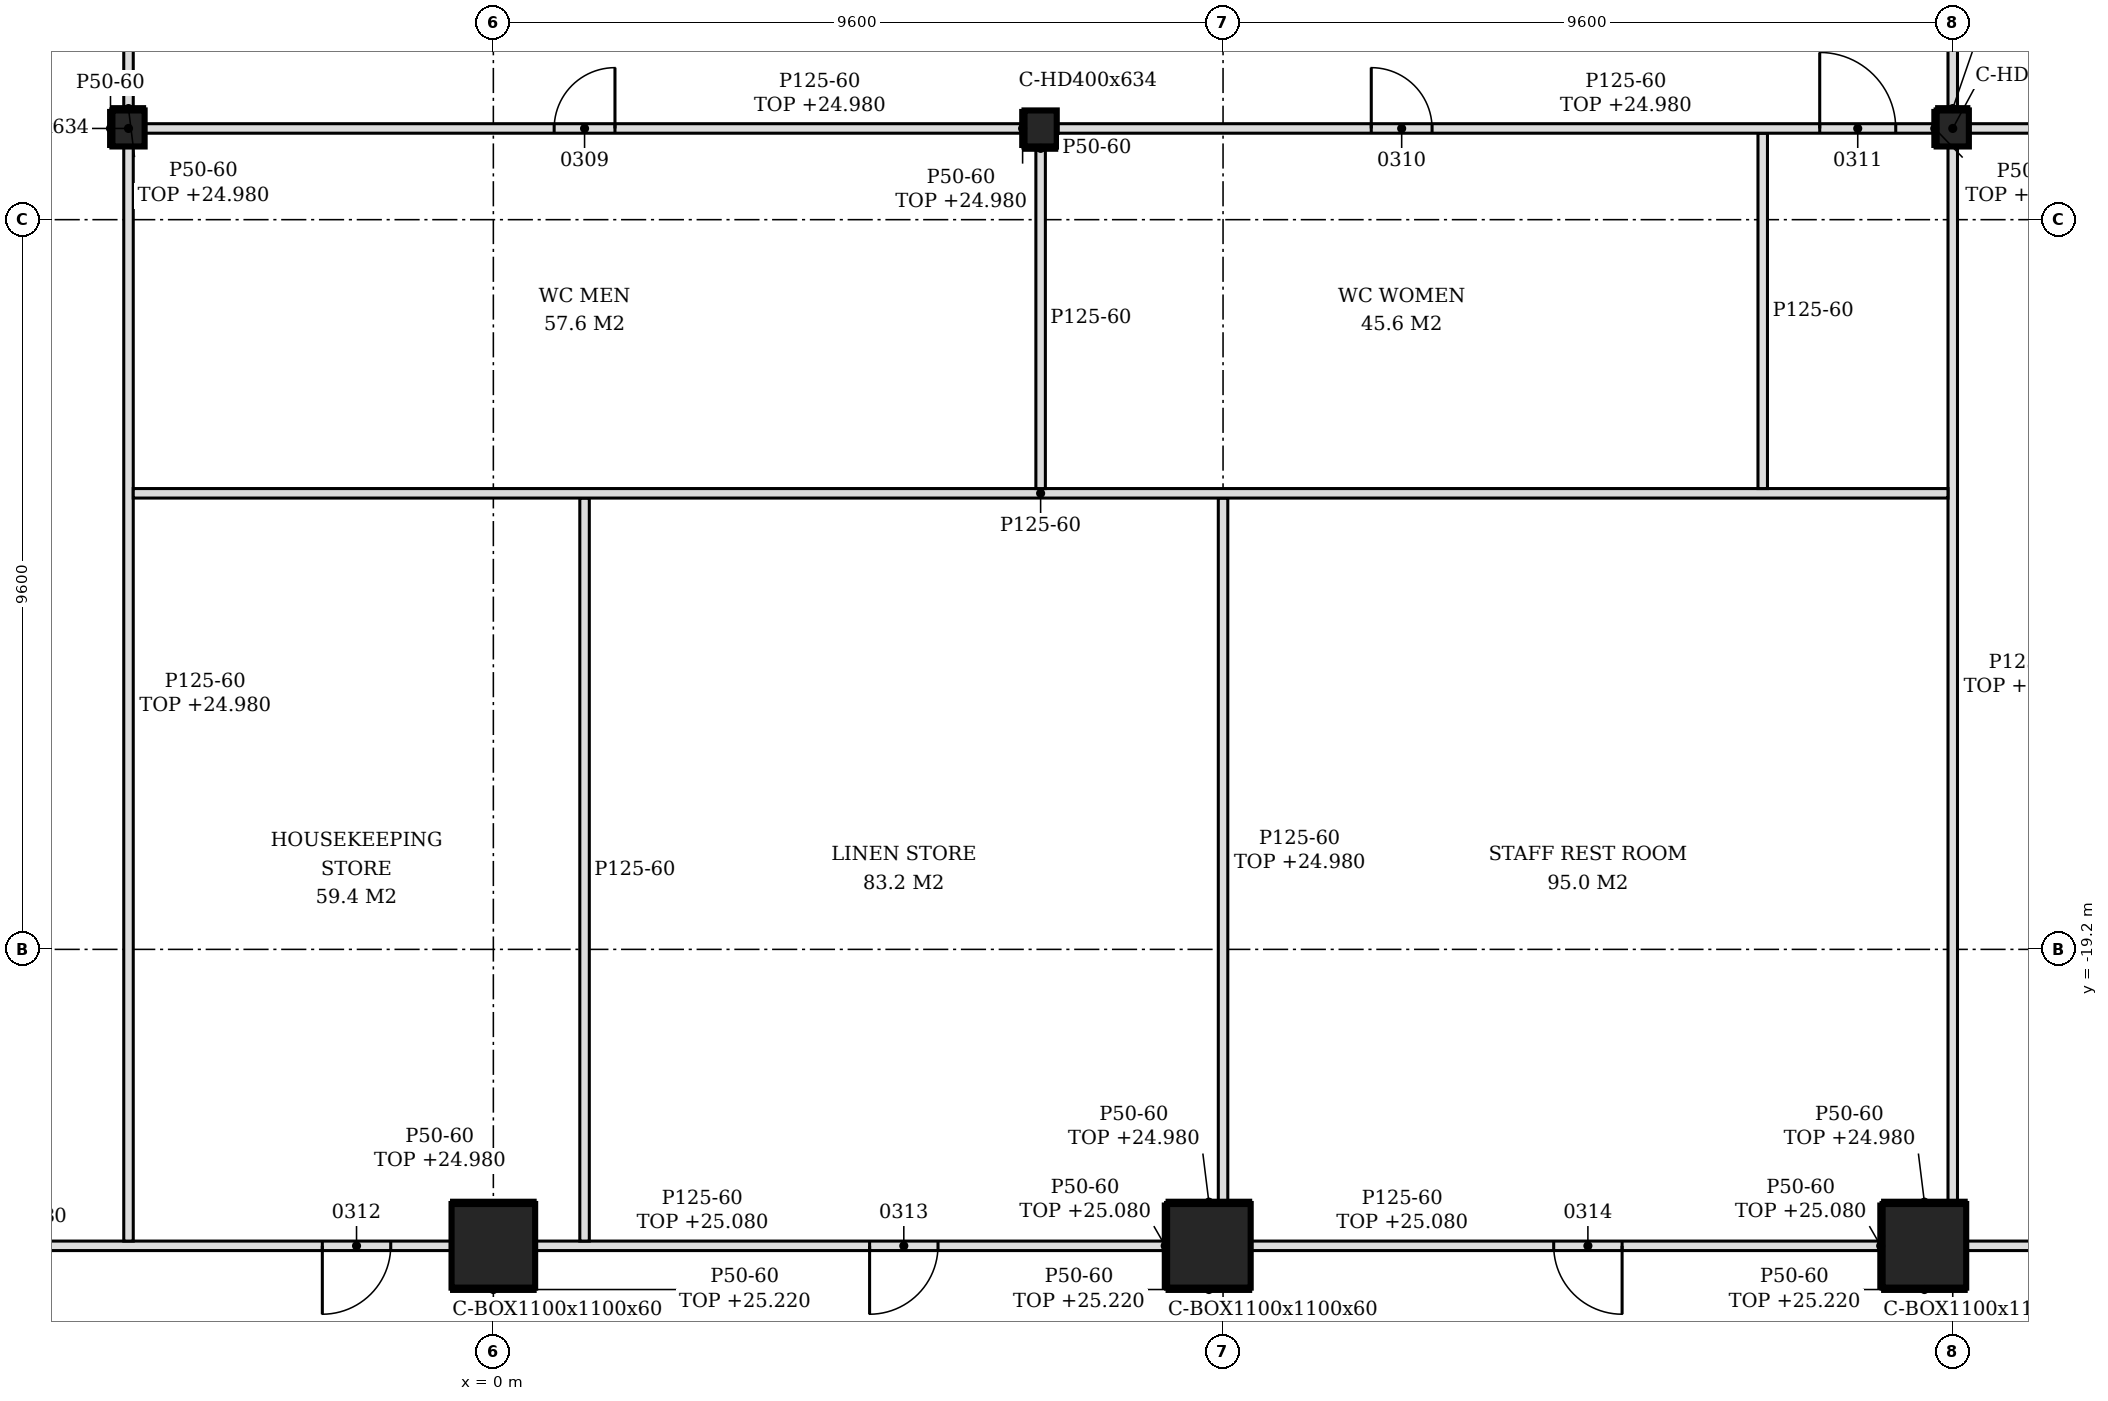
"""IFC4 building model, lengths in metres.
Left out: names, types, materials, properties, quantities, classifications, styles, units other than length and angle.
Written with IfcOpenShell. Run it as: python <this file> out.ifc"""

import sys

from ifc_helpers import new_model, si_unit, direction, frame, frame_2d, origin, origin_2d, place, context, subcontext, project, spatial, polyline, rectangle, hollow_rectangle, i_section, outline, extrude, element, fill, save


model = new_model("IFC4")
c1 = context("Model", 3, precision=1e-05, world=origin(), true_north=direction((0.0, 1.0)))
c2 = subcontext(c1, "Body", "Model", "MODEL_VIEW")
j1 = project(units=[si_unit("LENGTHUNIT", "METRE"), si_unit("PLANEANGLEUNIT", "RADIAN")], contexts=[c1])
p1 = place(None, origin())
s1 = spatial("IfcSite", under=j1, at=p1, CompositionType="ELEMENT")
p2 = place(p1, origin())
s2 = spatial("IfcBuilding", under=s1, at=p2, CompositionType="ELEMENT")
p3 = place(p2, frame((0.0, 0.0, 21.0)))
s3 = spatial("IfcBuildingStorey", under=s2, at=p3, CompositionType="ELEMENT", Elevation=21.0)
for number, where, z_axis, x_axis in (
    (1, (0.0, -23.1, -0.2), (0.0, 0.0, 1.0), (1.0, 0.0, 0.0)),
    (2, (9.414, -23.1, -0.2), (0.0, 0.0, 1.0), (1.0, 0.0, 0.0)),
    (3, (18.827, -23.1, -0.2), (0.0, 0.0, 1.0), (1.0, 0.0, 0.0)),
):
    element("IfcColumn", number, at=place(p3, frame(where, z_axis=z_axis, x_axis=x_axis)), inside=s3, PredefinedType="COLUMN", context=c2, shape_type="SweptSolid", body=[
        extrude(hollow_rectangle(XDim=1.1, YDim=1.1, WallThickness=0.06, at=origin_2d()), origin(), (0.0, 0.0, 1.0), 4.8),
    ])
for number, where, z_axis, x_axis in (
    (4, (-4.8, -8.4, -0.2), (0.0, 0.0, 1.0), (1.0, 0.0, 0.0)),
    (5, (7.2, -8.4, -0.2), (0.0, 0.0, 1.0), (1.0, 0.0, 0.0)),
    (6, (19.2, -8.4, -0.2), (0.0, 0.0, 1.0), (1.0, 0.0, 0.0)),
):
    element("IfcColumn", number, at=place(p3, frame(where, z_axis=z_axis, x_axis=x_axis)), inside=s3, PredefinedType="COLUMN", context=c2, shape_type="SweptSolid", body=[
        extrude(i_section(OverallWidth=0.424, OverallDepth=0.474, WebThickness=0.048, FlangeThickness=0.077, FilletRadius=0.015, at=origin_2d()), origin(), (0.0, 0.0, 1.0), 4.8),
    ])
p4 = place(p3, frame((-8.864, -23.1, 0.0), z_axis=(0.0, 0.0, 1.0), x_axis=(1.0, 0.0, 0.0)))
e7 = element("IfcWall", 7, at=p4, inside=s3, PredefinedType="PARTITIONING", context=c2, shape_type="SweptSolid", body=[
    extrude(rectangle(XDim=8.313, YDim=0.125, at=frame_2d((4.157, 0.0))), origin(), (0.0, 0.0, 1.0), 4.08),
])
p5 = place(p4, frame((6.614, 0.0, 0.0)))
e8 = element("IfcOpeningElement", 8, at=p5, cuts=e7, PredefinedType="OPENING", context=c2, shape_type="SweptSolid", body=[
    extrude(rectangle(XDim=0.9, YDim=2.1, at=frame_2d((0.45, 1.05))), frame((0.0, 0.073, 0.0), z_axis=(0.0, -1.0, 0.0), x_axis=(1.0, 0.0, 0.0)), (0.0, 0.0, 1.0), 0.145),
])
p6 = place(p3, frame((0.55, -23.1, 0.0), z_axis=(0.0, 0.0, 1.0), x_axis=(1.0, 0.0, 0.0)))
e9 = element("IfcWall", 9, at=p6, inside=s3, PredefinedType="PARTITIONING", context=c2, shape_type="SweptSolid", body=[
    extrude(rectangle(XDim=8.313, YDim=0.125, at=frame_2d((4.157, 0.0))), origin(), (0.0, 0.0, 1.0), 4.08),
])
p7 = place(p6, frame((4.4, 0.0, 0.0)))
e10 = element("IfcOpeningElement", 10, at=p7, cuts=e9, PredefinedType="OPENING", context=c2, shape_type="SweptSolid", body=[
    extrude(rectangle(XDim=0.9, YDim=2.1, at=frame_2d((0.45, 1.05))), frame((0.0, 0.073, 0.0), z_axis=(0.0, -1.0, 0.0), x_axis=(1.0, 0.0, 0.0)), (0.0, 0.0, 1.0), 0.145),
])
p8 = place(p3, frame((9.964, -23.1, 0.0), z_axis=(0.0, 0.0, 1.0), x_axis=(1.0, 0.0, 0.0)))
e11 = element("IfcWall", 11, at=p8, inside=s3, PredefinedType="PARTITIONING", context=c2, shape_type="SweptSolid", body=[
    extrude(rectangle(XDim=8.313, YDim=0.125, at=frame_2d((4.157, 0.0))), origin(), (0.0, 0.0, 1.0), 4.08),
])
p9 = place(p8, frame((3.986, 0.0, 0.0)))
e12 = element("IfcOpeningElement", 12, at=p9, cuts=e11, PredefinedType="OPENING", context=c2, shape_type="SweptSolid", body=[
    extrude(rectangle(XDim=0.9, YDim=2.1, at=frame_2d((0.45, 1.05))), frame((0.0, 0.073, 0.0), z_axis=(0.0, -1.0, 0.0), x_axis=(1.0, 0.0, 0.0)), (0.0, 0.0, 1.0), 0.145),
])
p10 = place(p3, frame((19.377, -23.1, 0.0), z_axis=(0.0, 0.0, 1.0), x_axis=(1.0, 0.0, 0.0)))
e13 = element("IfcWall", 13, at=p10, inside=s3, PredefinedType="PARTITIONING", context=c2, shape_type="SweptSolid", body=[
    extrude(rectangle(XDim=8.585, YDim=0.125, at=frame_2d((4.292, 0.0))), origin(), (0.0, 0.0, 1.0), 4.6),
])
p11 = place(p3, frame((-4.8, -23.038, 0.0), z_axis=(0.0, 0.0, 1.0), x_axis=(0.0, 1.0, 0.0)))
e14 = element("IfcWall", 14, at=p11, inside=s3, PredefinedType="PARTITIONING", context=c2, shape_type="SweptSolid", body=[
    extrude(rectangle(XDim=14.401, YDim=0.125, at=frame_2d((7.2, 0.0))), origin(), (0.0, 0.0, 1.0), 3.98),
])
p12 = place(p3, frame((1.2, -23.038, 0.0), z_axis=(0.0, 0.0, 1.0), x_axis=(0.0, 1.0, 0.0)))
e15 = element("IfcWall", 15, at=p12, inside=s3, PredefinedType="PARTITIONING", context=c2, shape_type="SweptSolid", body=[
    extrude(outline(polyline([(0.0, 0.0), (9.775, 0.0), (9.775, 4.6), (0.087, 4.6), (0.085, 4.08), (0.0, 4.08), (0.0, 0.0)])), frame((0.0, 0.062, 0.0), z_axis=(0.0, -1.0, 0.0), x_axis=(1.0, 0.0, 0.0)), (0.0, 0.0, 1.0), 0.125),
])
p13 = place(p3, frame((9.6, -22.55, 0.0), z_axis=(0.0, 0.0, 1.0), x_axis=(0.0, 1.0, 0.0)))
e16 = element("IfcWall", 16, at=p13, inside=s3, PredefinedType="PARTITIONING", context=c2, shape_type="SweptSolid", body=[
    extrude(rectangle(XDim=9.288, YDim=0.125, at=frame_2d((4.644, 0.0))), origin(), (0.0, 0.0, 1.0), 3.98),
])
p14 = place(p3, frame((19.2, -22.55, 0.0), z_axis=(0.0, 0.0, 1.0), x_axis=(0.0, 1.0, 0.0)))
e17 = element("IfcWall", 17, at=p14, inside=s3, PredefinedType="PARTITIONING", context=c2, shape_type="SweptSolid", body=[
    extrude(rectangle(XDim=13.913, YDim=0.125, at=frame_2d((6.957, 0.0))), origin(), (0.0, 0.0, 1.0), 3.98),
])
p15 = place(p3, frame((-4.738, -13.2, 0.0), z_axis=(0.0, 0.0, 1.0), x_axis=(1.0, 0.0, 0.0)))
e18 = element("IfcWall", 18, at=p15, inside=s3, PredefinedType="PARTITIONING", context=c2, shape_type="SweptSolid", body=[
    extrude(outline(polyline([(0.0, 0.0), (23.875, 0.0), (23.875, 3.98), (23.788, 3.98), (23.785, 4.6), (19.288, 4.6), (19.285, 3.98), (18.988, 3.98), (18.986, 4.6), (14.488, 4.6), (14.486, 3.98), (14.188, 3.98), (14.186, 4.6), (9.688, 4.6), (9.686, 3.98), (9.387, 3.98), (9.385, 4.6), (4.887, 4.6), (4.885, 3.98), (4.587, 3.98), (4.585, 4.6), (0.087, 4.6), (0.085, 3.98), (0.0, 3.98), (0.0, 0.0)])), frame((0.0, 0.062, 0.0), z_axis=(0.0, -1.0, 0.0), x_axis=(1.0, 0.0, 0.0)), (0.0, 0.0, 1.0), 0.125),
])
p16 = place(p3, frame((7.2, -13.137, 0.0), z_axis=(0.0, 0.0, 1.0), x_axis=(0.0, 1.0, 0.0)))
e19 = element("IfcWall", 19, at=p16, inside=s3, PredefinedType="PARTITIONING", context=c2, shape_type="SweptSolid", body=[
    extrude(rectangle(XDim=4.5, YDim=0.125, at=frame_2d((2.25, 0.0))), origin(), (0.0, 0.0, 1.0), 4.6),
])
p17 = place(p3, frame((16.7, -13.137, 0.0), z_axis=(0.0, 0.0, 1.0), x_axis=(0.0, 1.0, 0.0)))
e20 = element("IfcWall", 20, at=p17, inside=s3, PredefinedType="PARTITIONING", context=c2, shape_type="SweptSolid", body=[
    extrude(outline(polyline([(0.0, 0.0), (4.675, 0.0), (4.675, 3.98), (4.587, 3.98), (4.585, 4.6), (0.0, 4.6), (0.0, 0.0)])), frame((0.0, 0.062, 0.0), z_axis=(0.0, -1.0, 0.0), x_axis=(1.0, 0.0, 0.0)), (0.0, 0.0, 1.0), 0.125),
])
p18 = place(p3, frame((-4.588, -8.4, 0.0), z_axis=(0.0, 0.0, 1.0), x_axis=(1.0, 0.0, 0.0)))
e21 = element("IfcWall", 21, at=p18, inside=s3, PredefinedType="PARTITIONING", context=c2, shape_type="SweptSolid", body=[
    extrude(rectangle(XDim=11.576, YDim=0.125, at=frame_2d((5.788, 0.0))), origin(), (0.0, 0.0, 1.0), 3.98),
])
p19 = place(p18, frame((5.388, 0.0, 0.0)))
e22 = element("IfcOpeningElement", 22, at=p19, cuts=e21, PredefinedType="OPENING", context=c2, shape_type="SweptSolid", body=[
    extrude(rectangle(XDim=0.8, YDim=2.1, at=frame_2d((0.4, 1.05))), frame((0.0, 0.073, 0.0), z_axis=(0.0, -1.0, 0.0), x_axis=(1.0, 0.0, 0.0)), (0.0, 0.0, 1.0), 0.145),
])
p20 = place(p3, frame((7.412, -8.4, 0.0), z_axis=(0.0, 0.0, 1.0), x_axis=(1.0, 0.0, 0.0)))
e23 = element("IfcWall", 23, at=p20, inside=s3, PredefinedType="PARTITIONING", context=c2, shape_type="SweptSolid", body=[
    extrude(rectangle(XDim=11.576, YDim=0.125, at=frame_2d((5.788, 0.0))), origin(), (0.0, 0.0, 1.0), 3.98),
])
p21 = place(p20, frame((4.138, 0.0, 0.0)))
e24 = element("IfcOpeningElement", 24, at=p21, cuts=e23, PredefinedType="OPENING", context=c2, shape_type="SweptSolid", body=[
    extrude(rectangle(XDim=0.8, YDim=2.1, at=frame_2d((0.4, 1.05))), frame((0.0, 0.073, 0.0), z_axis=(0.0, -1.0, 0.0), x_axis=(1.0, 0.0, 0.0)), (0.0, 0.0, 1.0), 0.145),
])
p22 = place(p20, frame((10.038, 0.0, 0.0)))
e25 = element("IfcOpeningElement", 25, at=p22, cuts=e23, PredefinedType="OPENING", context=c2, shape_type="SweptSolid", body=[
    extrude(rectangle(XDim=1.0, YDim=2.1, at=frame_2d((0.5, 1.05))), frame((0.0, 0.073, 0.0), z_axis=(0.0, -1.0, 0.0), x_axis=(1.0, 0.0, 0.0)), (0.0, 0.0, 1.0), 0.145),
])
p23 = place(p3, frame((19.412, -8.4, 0.0), z_axis=(0.0, 0.0, 1.0), x_axis=(1.0, 0.0, 0.0)))
e26 = element("IfcWall", 26, at=p23, inside=s3, PredefinedType="PARTITIONING", context=c2, shape_type="SweptSolid", body=[
    extrude(outline(polyline([(0.0, 0.0), (8.425, 0.0), (8.426, 4.08), (8.338, 4.08), (8.336, 4.6), (0.0, 4.6), (0.0, 0.0)])), frame((0.0, 0.062, 0.0), z_axis=(0.0, -1.0, 0.0), x_axis=(1.0, 0.0, 0.0)), (0.0, 0.0, 1.0), 0.125),
])
for number, where, z_axis, x_axis in (
    (27, (-4.8, -8.163, 0.0), (0.0, 0.0, 1.0), (0.0, 1.0, 0.0)),
    (28, (19.2, -8.163, 0.0), (0.0, 0.0, 1.0), (0.0, 1.0, 0.0)),
):
    element("IfcWall", number, at=place(p3, frame(where, z_axis=z_axis, x_axis=x_axis)), inside=s3, PredefinedType="PARTITIONING", context=c2, shape_type="SweptSolid", body=[
        extrude(rectangle(XDim=10.326, YDim=0.125, at=frame_2d((5.163, 0.0))), origin(), (0.0, 0.0, 1.0), 3.98),
    ])
p24 = place(p3, frame((-0.55, -22.525, 0.0), z_axis=(0.0, 0.0, 1.0), x_axis=(1.0, 0.0, 0.0)))
e29 = element("IfcWall", 29, at=p24, inside=s3, PredefinedType="PARTITIONING", context=c2, shape_type="SweptSolid", body=[
    extrude(rectangle(XDim=1.1, YDim=0.05, at=frame_2d((0.55, 0.0))), origin(), (0.0, 0.0, 1.0), 3.98),
])
p25 = place(p3, frame((-0.55, -23.675, 0.0), z_axis=(0.0, 0.0, 1.0), x_axis=(1.0, 0.0, 0.0)))
e30 = element("IfcWall", 30, at=p25, inside=s3, PredefinedType="PARTITIONING", context=c2, shape_type="SweptSolid", body=[
    extrude(rectangle(XDim=1.1, YDim=0.05, at=frame_2d((0.55, 0.0))), origin(), (0.0, 0.0, 1.0), 4.22),
])
p26 = place(p3, frame((8.864, -22.525, 0.0), z_axis=(0.0, 0.0, 1.0), x_axis=(1.0, 0.0, 0.0)))
e31 = element("IfcWall", 31, at=p26, inside=s3, PredefinedType="PARTITIONING", context=c2, shape_type="SweptSolid", body=[
    extrude(rectangle(XDim=1.1, YDim=0.05, at=frame_2d((0.55, 0.0))), origin(), (0.0, 0.0, 1.0), 3.98),
])
p27 = place(p3, frame((8.864, -23.675, 0.0), z_axis=(0.0, 0.0, 1.0), x_axis=(1.0, 0.0, 0.0)))
e32 = element("IfcWall", 32, at=p27, inside=s3, PredefinedType="PARTITIONING", context=c2, shape_type="SweptSolid", body=[
    extrude(rectangle(XDim=1.1, YDim=0.05, at=frame_2d((0.55, 0.0))), origin(), (0.0, 0.0, 1.0), 4.22),
])
p28 = place(p3, frame((18.277, -22.525, 0.0), z_axis=(0.0, 0.0, 1.0), x_axis=(1.0, 0.0, 0.0)))
e33 = element("IfcWall", 33, at=p28, inside=s3, PredefinedType="PARTITIONING", context=c2, shape_type="SweptSolid", body=[
    extrude(rectangle(XDim=1.1, YDim=0.05, at=frame_2d((0.55, 0.0))), origin(), (0.0, 0.0, 1.0), 3.98),
])
p29 = place(p3, frame((18.277, -23.675, 0.0), z_axis=(0.0, 0.0, 1.0), x_axis=(1.0, 0.0, 0.0)))
e34 = element("IfcWall", 34, at=p29, inside=s3, PredefinedType="PARTITIONING", context=c2, shape_type="SweptSolid", body=[
    extrude(rectangle(XDim=1.1, YDim=0.05, at=frame_2d((0.55, 0.0))), origin(), (0.0, 0.0, 1.0), 4.22),
])
p30 = place(p3, frame((-5.037, -8.637, 0.0), z_axis=(0.0, 0.0, 1.0), x_axis=(0.0, 1.0, 0.0)))
e35 = element("IfcWall", 35, at=p30, inside=s3, PredefinedType="PARTITIONING", context=c2, shape_type="SweptSolid", body=[
    extrude(rectangle(XDim=0.474, YDim=0.05, at=frame_2d((0.237, 0.0))), origin(), (0.0, 0.0, 1.0), 4.6),
])
for number, where, z_axis, x_axis in (
    (36, (8.839, -23.65, 0.0), (0.0, 0.0, 1.0), (0.0, 1.0, 0.0)),
    (37, (18.252, -23.65, 0.0), (0.0, 0.0, 1.0), (0.0, 1.0, 0.0)),
):
    element("IfcWall", number, at=place(p3, frame(where, z_axis=z_axis, x_axis=x_axis)), inside=s3, PredefinedType="PARTITIONING", context=c2, shape_type="SweptSolid", body=[
        extrude(rectangle(XDim=1.1, YDim=0.05, at=frame_2d((0.55, 0.0))), origin(), (0.0, 0.0, 1.0), 4.08),
    ])
for number, where, z_axis, x_axis in (
    (38, (18.963, -8.637, 0.0), (0.0, 0.0, 1.0), (0.0, 1.0, 0.0)),
    (39, (6.963, -8.637, 0.0), (0.0, 0.0, 1.0), (0.0, 1.0, 0.0)),
):
    element("IfcWall", number, at=place(p3, frame(where, z_axis=z_axis, x_axis=x_axis)), inside=s3, PredefinedType="PARTITIONING", context=c2, shape_type="SweptSolid", body=[
        extrude(rectangle(XDim=0.474, YDim=0.05, at=frame_2d((0.237, 0.0))), origin(), (0.0, 0.0, 1.0), 3.98),
    ])
p31 = place(p3, frame((-5.012, -8.138, 0.0), z_axis=(0.0, 0.0, 1.0), x_axis=(1.0, 0.0, 0.0)))
e40 = element("IfcWall", 40, at=p31, inside=s3, PredefinedType="PARTITIONING", context=c2, shape_type="SweptSolid", body=[
    extrude(rectangle(XDim=0.424, YDim=0.05, at=frame_2d((0.212, 0.0))), origin(), (0.0, 0.0, 1.0), 3.98),
])
p32 = place(p3, frame((6.988, -8.662, 0.0), z_axis=(0.0, 0.0, 1.0), x_axis=(1.0, 0.0, 0.0)))
e41 = element("IfcWall", 41, at=p32, inside=s3, PredefinedType="PARTITIONING", context=c2, shape_type="SweptSolid", body=[
    extrude(rectangle(XDim=0.424, YDim=0.05, at=frame_2d((0.212, 0.0))), origin(), (0.0, 0.0, 1.0), 4.6),
])
p33 = place(p3, frame((18.988, -8.138, 0.0), z_axis=(0.0, 0.0, 1.0), x_axis=(1.0, 0.0, 0.0)))
e42 = element("IfcWall", 42, at=p33, inside=s3, PredefinedType="PARTITIONING", context=c2, shape_type="SweptSolid", body=[
    extrude(rectangle(XDim=0.424, YDim=0.05, at=frame_2d((0.212, 0.0))), origin(), (0.0, 0.0, 1.0), 3.98),
])
p34 = place(p19, origin())
e43 = element("IfcDoor", 43, at=p34, inside=s3, OperationType="SINGLE_SWING_RIGHT", PredefinedType="DOOR", context=c2, shape_type="SweptSolid", body=[
    extrude(rectangle(XDim=0.8, YDim=2.1, at=frame_2d((0.4, 1.05))), frame((0.0, 0.025, 0.0), z_axis=(0.0, -1.0, 0.0), x_axis=(1.0, 0.0, 0.0)), (0.0, 0.0, 1.0), 0.05),
])
fill(e22, e43)
p35 = place(p21, origin())
e44 = element("IfcDoor", 44, at=p35, inside=s3, OperationType="SINGLE_SWING_LEFT", PredefinedType="DOOR", context=c2, shape_type="SweptSolid", body=[
    extrude(rectangle(XDim=0.8, YDim=2.1, at=frame_2d((0.4, 1.05))), frame((0.0, 0.025, 0.0), z_axis=(0.0, -1.0, 0.0), x_axis=(1.0, 0.0, 0.0)), (0.0, 0.0, 1.0), 0.05),
])
fill(e24, e44)
p36 = place(p22, origin())
e45 = element("IfcDoor", 45, at=p36, inside=s3, OperationType="SINGLE_SWING_LEFT", PredefinedType="DOOR", context=c2, shape_type="SweptSolid", body=[
    extrude(rectangle(XDim=1.0, YDim=2.1, at=frame_2d((0.5, 1.05))), frame((0.0, 0.025, 0.0), z_axis=(0.0, -1.0, 0.0), x_axis=(1.0, 0.0, 0.0)), (0.0, 0.0, 1.0), 0.05),
])
fill(e25, e45)
p37 = place(p5, frame((0.9, 0.0, 0.0), z_axis=(0.0, 0.0, 1.0), x_axis=(-1.0, 0.0, 0.0)))
e46 = element("IfcDoor", 46, at=p37, inside=s3, OperationType="SINGLE_SWING_RIGHT", PredefinedType="DOOR", context=c2, shape_type="SweptSolid", body=[
    extrude(rectangle(XDim=0.9, YDim=2.1, at=frame_2d((0.45, 1.05))), frame((0.0, 0.025, 0.0), z_axis=(0.0, -1.0, 0.0), x_axis=(1.0, 0.0, 0.0)), (0.0, 0.0, 1.0), 0.05),
])
fill(e8, e46)
p38 = place(p7, frame((0.9, 0.0, 0.0), z_axis=(0.0, 0.0, 1.0), x_axis=(-1.0, 0.0, 0.0)))
e47 = element("IfcDoor", 47, at=p38, inside=s3, OperationType="SINGLE_SWING_RIGHT", PredefinedType="DOOR", context=c2, shape_type="SweptSolid", body=[
    extrude(rectangle(XDim=0.9, YDim=2.1, at=frame_2d((0.45, 1.05))), frame((0.0, 0.025, 0.0), z_axis=(0.0, -1.0, 0.0), x_axis=(1.0, 0.0, 0.0)), (0.0, 0.0, 1.0), 0.05),
])
fill(e10, e47)
p39 = place(p9, frame((0.9, 0.0, 0.0), z_axis=(0.0, 0.0, 1.0), x_axis=(-1.0, 0.0, 0.0)))
e48 = element("IfcDoor", 48, at=p39, inside=s3, OperationType="SINGLE_SWING_LEFT", PredefinedType="DOOR", context=c2, shape_type="SweptSolid", body=[
    extrude(rectangle(XDim=0.9, YDim=2.1, at=frame_2d((0.45, 1.05))), frame((0.0, 0.025, 0.0), z_axis=(0.0, -1.0, 0.0), x_axis=(1.0, 0.0, 0.0)), (0.0, 0.0, 1.0), 0.05),
])
fill(e12, e48)
save(model, sys.argv[1])
